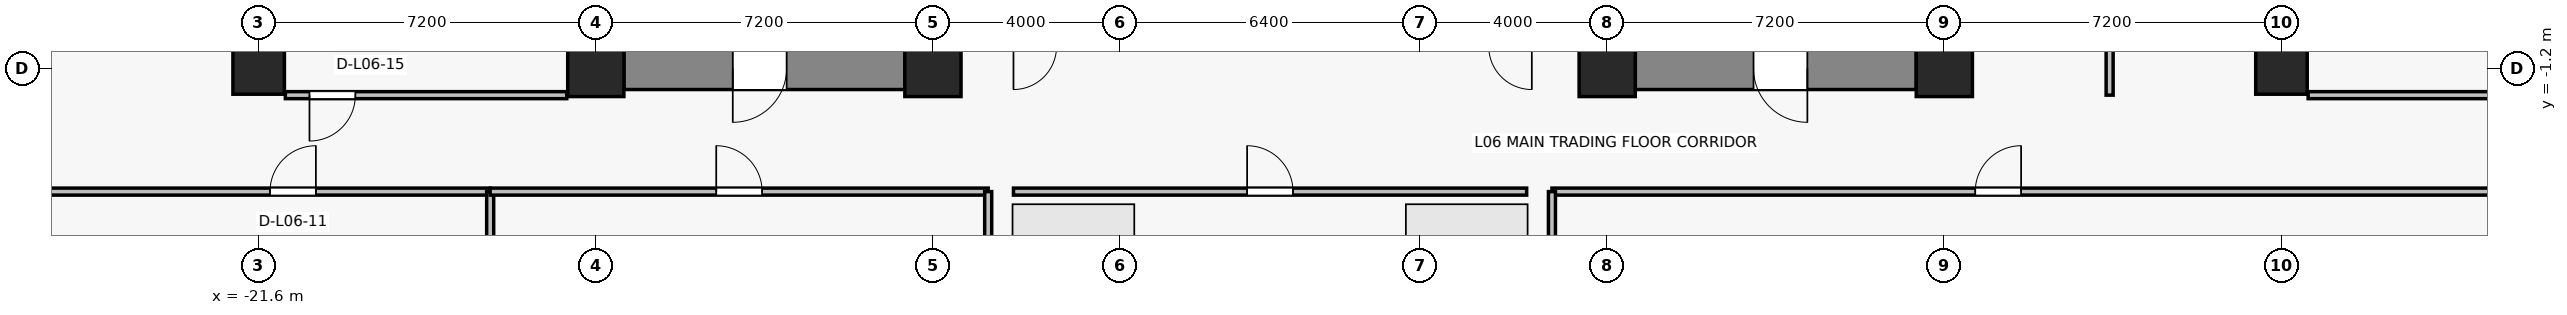
"""IFC4 building model, lengths in metres.
Left out: names, types, materials, properties, quantities, classifications, styles, units other than length and angle.
Written with IfcOpenShell. Run it as: python <this file> out.ifc"""

import sys

from ifc_helpers import new_model, si_unit, direction, frame, frame_2d, origin, origin_2d, place, context, subcontext, project, spatial, rectangle, extrude, source, transform, mapped, element, fill, save


model = new_model("IFC4")
c1 = context("Model", 3, precision=1e-05, world=origin(), true_north=direction((0.0, 1.0)))
c2 = subcontext(c1, "Body", "Model", "MODEL_VIEW")
j1 = project(units=[si_unit("LENGTHUNIT", "METRE"), si_unit("PLANEANGLEUNIT", "RADIAN")], contexts=[c1])
p1 = place(None, origin())
s1 = spatial("IfcSite", under=j1, at=p1, CompositionType="ELEMENT")
p2 = place(p1, origin())
s2 = spatial("IfcBuilding", under=s1, at=p2, CompositionType="ELEMENT")
p3 = place(p2, frame((0.0, 0.0, 27.4)))
s3 = spatial("IfcBuildingStorey", under=s2, at=p3, CompositionType="ELEMENT", Elevation=27.4)
for number, where, z_axis, x_axis in (
    (1, (-14.4, -1.2, 0.0), (0.0, 0.0, 1.0), (1.0, 0.0, 0.0)),
    (2, (-7.2, -1.2, 0.0), (0.0, 0.0, 1.0), (1.0, 0.0, 0.0)),
    (3, (7.2, -1.2, 0.0), (0.0, 0.0, 1.0), (1.0, 0.0, 0.0)),
    (4, (14.4, -1.2, 0.0), (0.0, 0.0, 1.0), (1.0, 0.0, 0.0)),
):
    element("IfcColumn", number, at=place(p3, frame(where, z_axis=z_axis, x_axis=x_axis)), inside=s3, PredefinedType="COLUMN", context=c2, shape_type="SweptSolid", body=[
        extrude(rectangle(XDim=1.2, YDim=1.2, at=origin_2d()), origin(), (0.0, 0.0, 1.0), 3.3),
    ])
for number, where, z_axis, x_axis in (
    (5, (-21.6, -1.2, 0.0), (0.0, 0.0, 1.0), (1.0, 0.0, 0.0)),
    (6, (21.6, -1.2, 0.0), (0.0, 0.0, 1.0), (1.0, 0.0, 0.0)),
):
    element("IfcColumn", number, at=place(p3, frame(where, z_axis=z_axis, x_axis=x_axis)), inside=s3, PredefinedType="COLUMN", context=c2, shape_type="SweptSolid", body=[
        extrude(rectangle(XDim=1.1, YDim=1.1, at=origin_2d()), origin(), (0.0, 0.0, 1.0), 3.3),
    ])
p4 = place(p3, frame((-7.8, -1.2, 0.0), z_axis=(0.0, 0.0, 1.0), x_axis=(-1.0, 0.0, 0.0)))
e7 = element("IfcWall", 7, at=p4, inside=s3, PredefinedType="SHEAR", context=c2, shape_type="SweptSolid", body=[
    extrude(rectangle(XDim=6.0, YDim=0.9, at=frame_2d((3.0, 0.0))), origin(), (0.0, 0.0, 1.0), 3.075),
])
p5 = place(p4, frame((2.525, 0.0, 0.0)))
e8 = element("IfcOpeningElement", 8, at=p5, cuts=e7, PredefinedType="OPENING", context=c2, shape_type="SweptSolid", body=[
    extrude(rectangle(XDim=1.15, YDim=2.15, at=frame_2d((0.575, 1.075))), frame((0.0, 0.46, 0.0), z_axis=(0.0, -1.0, 0.0), x_axis=(1.0, 0.0, 0.0)), (0.0, 0.0, 1.0), 0.92),
])
p6 = place(p3, frame((13.8, -1.2, 0.0), z_axis=(0.0, 0.0, 1.0), x_axis=(-1.0, 0.0, 0.0)))
e9 = element("IfcWall", 9, at=p6, inside=s3, PredefinedType="SHEAR", context=c2, shape_type="SweptSolid", body=[
    extrude(rectangle(XDim=6.0, YDim=0.9, at=frame_2d((3.0, 0.0))), origin(), (0.0, 0.0, 1.0), 3.075),
])
p7 = place(p6, frame((2.325, 0.0, 0.0)))
e10 = element("IfcOpeningElement", 10, at=p7, cuts=e9, PredefinedType="OPENING", context=c2, shape_type="SweptSolid", body=[
    extrude(rectangle(XDim=1.15, YDim=2.15, at=frame_2d((0.575, 1.075))), frame((0.0, 0.46, 0.0), z_axis=(0.0, -1.0, 0.0), x_axis=(1.0, 0.0, 0.0)), (0.0, 0.0, 1.0), 0.92),
])
p8 = place(p3, frame((-32.53, -3.83, 0.0), z_axis=(0.0, 0.0, 1.0), x_axis=(1.0, 0.0, 0.0)))
e11 = element("IfcWall", 11, at=p8, inside=s3, PredefinedType="PARTITIONING", context=c2, shape_type="SweptSolid", body=[
    extrude(rectangle(XDim=15.874, YDim=0.15, at=frame_2d((7.937, 0.0))), origin(), (0.0, 0.0, 1.0), 2.465),
])
p9 = place(p8, frame((11.172, 0.0, 0.0)))
e12 = element("IfcOpeningElement", 12, at=p9, cuts=e11, PredefinedType="OPENING", context=c2, shape_type="SweptSolid", body=[
    extrude(rectangle(XDim=0.98, YDim=2.15, at=frame_2d((0.49, 1.075))), frame((0.0, 0.085, 0.0), z_axis=(0.0, -1.0, 0.0), x_axis=(1.0, 0.0, 0.0)), (0.0, 0.0, 1.0), 0.17),
])
p10 = place(p3, frame((-16.656, -3.83, 0.0), z_axis=(0.0, 0.0, 1.0), x_axis=(0.0, -1.0, 0.0)))
e13 = element("IfcWall", 13, at=p10, inside=s3, PredefinedType="PARTITIONING", context=c2, shape_type="SweptSolid", body=[
    extrude(rectangle(XDim=14.3, YDim=0.15, at=frame_2d((7.15, 0.0))), origin(), (0.0, 0.0, 1.0), 2.465),
])
p11 = place(p3, frame((-16.656, -3.83, 0.0), z_axis=(0.0, 0.0, 1.0), x_axis=(1.0, 0.0, 0.0)))
e14 = element("IfcWall", 14, at=p11, inside=s3, PredefinedType="PARTITIONING", context=c2, shape_type="SweptSolid", body=[
    extrude(rectangle(XDim=10.636, YDim=0.15, at=frame_2d((5.318, 0.0))), origin(), (0.0, 0.0, 1.0), 2.465),
])
p12 = place(p11, frame((4.828, 0.0, 0.0)))
e15 = element("IfcOpeningElement", 15, at=p12, cuts=e14, PredefinedType="OPENING", context=c2, shape_type="SweptSolid", body=[
    extrude(rectangle(XDim=0.98, YDim=2.15, at=frame_2d((0.49, 1.075))), frame((0.0, 0.085, 0.0), z_axis=(0.0, -1.0, 0.0), x_axis=(1.0, 0.0, 0.0)), (0.0, 0.0, 1.0), 0.17),
])
p13 = place(p3, frame((-6.02, -3.83, 0.0), z_axis=(0.0, 0.0, 1.0), x_axis=(0.0, -1.0, 0.0)))
e16 = element("IfcWall", 16, at=p13, inside=s3, PredefinedType="PARTITIONING", context=c2, shape_type="SweptSolid", body=[
    extrude(rectangle(XDim=14.3, YDim=0.15, at=frame_2d((7.15, 0.0))), origin(), (0.0, 0.0, 1.0), 2.465),
])
p14 = place(p3, frame((6.02, -3.83, 0.0), z_axis=(0.0, 0.0, 1.0), x_axis=(1.0, 0.0, 0.0)))
e17 = element("IfcWall", 17, at=p14, inside=s3, PredefinedType="PARTITIONING", context=c2, shape_type="SweptSolid", body=[
    extrude(rectangle(XDim=22.51, YDim=0.15, at=frame_2d((11.255, 0.0))), origin(), (0.0, 0.0, 1.0), 2.465),
])
p15 = place(p14, frame((9.04, 0.0, 0.0)))
e18 = element("IfcOpeningElement", 18, at=p15, cuts=e17, PredefinedType="OPENING", context=c2, shape_type="SweptSolid", body=[
    extrude(rectangle(XDim=0.98, YDim=2.15, at=frame_2d((0.49, 1.075))), frame((0.0, 0.085, 0.0), z_axis=(0.0, -1.0, 0.0), x_axis=(1.0, 0.0, 0.0)), (0.0, 0.0, 1.0), 0.17),
])
p16 = place(p3, frame((6.02, -18.13, 0.0), z_axis=(0.0, 0.0, 1.0), x_axis=(0.0, 1.0, 0.0)))
e19 = element("IfcWall", 19, at=p16, inside=s3, PredefinedType="PARTITIONING", context=c2, shape_type="SweptSolid", body=[
    extrude(rectangle(XDim=14.3, YDim=0.15, at=frame_2d((7.15, 0.0))), origin(), (0.0, 0.0, 1.0), 2.465),
])
p17 = place(p3, frame((-5.48, -3.83, 0.0), z_axis=(0.0, 0.0, 1.0), x_axis=(1.0, 0.0, 0.0)))
e20 = element("IfcWall", 20, at=p17, inside=s3, PredefinedType="PARTITIONING", context=c2, shape_type="SweptSolid", body=[
    extrude(rectangle(XDim=10.96, YDim=0.15, at=frame_2d((5.48, 0.0))), origin(), (0.0, 0.0, 1.0), 3.075),
])
p18 = place(p17, frame((4.99, 0.0, 0.0)))
e21 = element("IfcOpeningElement", 21, at=p18, cuts=e20, PredefinedType="OPENING", context=c2, shape_type="SweptSolid", body=[
    extrude(rectangle(XDim=0.98, YDim=2.15, at=frame_2d((0.49, 1.075))), frame((0.0, 0.085, 0.0), z_axis=(0.0, -1.0, 0.0), x_axis=(1.0, 0.0, 0.0)), (0.0, 0.0, 1.0), 0.17),
])
p19 = place(p3, frame((-15.02, -1.77, 0.0), z_axis=(0.0, 0.0, 1.0), x_axis=(-1.0, 0.0, 0.0)))
e22 = element("IfcWall", 22, at=p19, inside=s3, PredefinedType="PARTITIONING", context=c2, shape_type="SweptSolid", body=[
    extrude(rectangle(XDim=6.01, YDim=0.15, at=frame_2d((3.005, 0.0))), origin(), (0.0, 0.0, 1.0), 3.075),
])
p20 = place(p19, frame((4.515, 0.0, 0.0)))
e23 = element("IfcOpeningElement", 23, at=p20, cuts=e22, PredefinedType="OPENING", context=c2, shape_type="SweptSolid", body=[
    extrude(rectangle(XDim=0.98, YDim=2.15, at=frame_2d((0.49, 1.075))), frame((0.0, 0.085, 0.0), z_axis=(0.0, -1.0, 0.0), x_axis=(1.0, 0.0, 0.0)), (0.0, 0.0, 1.0), 0.17),
])
p21 = place(p3, frame((28.53, -1.77, 0.0), z_axis=(0.0, 0.0, 1.0), x_axis=(-1.0, 0.0, 0.0)))
e24 = element("IfcWall", 24, at=p21, inside=s3, PredefinedType="PARTITIONING", context=c2, shape_type="SweptSolid", body=[
    extrude(rectangle(XDim=6.36, YDim=0.15, at=frame_2d((3.18, 0.0))), origin(), (0.0, 0.0, 1.0), 2.465),
])
p22 = place(p3, frame((17.93, -1.77, 0.0), z_axis=(0.0, 0.0, 1.0), x_axis=(0.0, 1.0, 0.0)))
e25 = element("IfcWall", 25, at=p22, inside=s3, PredefinedType="PARTITIONING", context=c2, shape_type="SweptSolid", body=[
    extrude(rectangle(XDim=6.292, YDim=0.15, at=frame_2d((3.146, 0.0))), origin(), (0.0, 0.0, 1.0), 2.465),
])
p23 = place(p22, frame((2.656, 0.0, 0.0)))
e26 = element("IfcOpeningElement", 26, at=p23, cuts=e25, PredefinedType="OPENING", context=c2, shape_type="SweptSolid", body=[
    extrude(rectangle(XDim=0.98, YDim=2.15, at=frame_2d((0.49, 1.075))), frame((0.0, 0.085, 0.0), z_axis=(0.0, -1.0, 0.0), x_axis=(1.0, 0.0, 0.0)), (0.0, 0.0, 1.0), 0.17),
])
p24 = place(p3, frame((0.0, 0.0, -0.25)))
p25 = place(p24, frame((-4.2, -5.7, 0.0)))
p26 = place(p25, frame((0.0, 0.0, 0.2)))
e27 = element("IfcWindow", 27, at=p26, inside=s3, PartitioningType="SINGLE_PANEL", PredefinedType="SKYLIGHT", context=c2, shape_type="SweptSolid", body=[
    extrude(rectangle(XDim=2.6, YDim=3.2, at=origin_2d()), origin(), (0.0, 0.0, 1.0), 0.05),
])
p27 = place(p24, frame((4.2, -5.7, 0.0)))
p28 = place(p27, frame((0.0, 0.0, 0.2)))
e28 = element("IfcWindow", 28, at=p28, inside=s3, PartitioningType="SINGLE_PANEL", PredefinedType="SKYLIGHT", context=c2, shape_type="SweptSolid", body=[
    extrude(rectangle(XDim=2.6, YDim=3.2, at=origin_2d()), origin(), (0.0, 0.0, 1.0), 0.05),
])
m1 = source(origin(), c2, "Body", "SweptSolid", [
    extrude(rectangle(XDim=1.15, YDim=2.15, at=frame_2d((0.575, 1.075))), frame((0.0, 0.025, 0.0), z_axis=(0.0, -1.0, 0.0), x_axis=(1.0, 0.0, 0.0)), (0.0, 0.0, 1.0), 0.05),
])
p29 = place(p5, origin())
e29 = element("IfcDoor", 29, at=p29, inside=s3, OperationType="SINGLE_SWING_RIGHT", PredefinedType="DOOR", context=c2, shape_type="MappedRepresentation", body=[
    mapped(m1, transform((0.0, 0.0, 0.0), x_axis=(1.0, 0.0, 0.0), y_axis=(0.0, 1.0, 0.0), z_axis=(0.0, 0.0, 1.0), scale=1.0)),
])
fill(e8, e29)
p30 = place(p7, origin())
e30 = element("IfcDoor", 30, at=p30, inside=s3, OperationType="SINGLE_SWING_LEFT", PredefinedType="DOOR", context=c2, shape_type="MappedRepresentation", body=[
    mapped(m1, transform((0.0, 0.0, 0.0), x_axis=(1.0, 0.0, 0.0), y_axis=(0.0, 1.0, 0.0), z_axis=(0.0, 0.0, 1.0), scale=1.0)),
])
fill(e10, e30)
m2 = source(origin(), c2, "Body", "SweptSolid", [
    extrude(rectangle(XDim=0.98, YDim=2.15, at=frame_2d((0.49, 1.075))), frame((0.0, 0.025, 0.0), z_axis=(0.0, -1.0, 0.0), x_axis=(1.0, 0.0, 0.0)), (0.0, 0.0, 1.0), 0.05),
])
p31 = place(p9, origin())
e31 = element("IfcDoor", 31, at=p31, inside=s3, OperationType="SINGLE_SWING_RIGHT", PredefinedType="DOOR", context=c2, shape_type="MappedRepresentation", body=[
    mapped(m2, transform((0.0, 0.0, 0.0), x_axis=(1.0, 0.0, 0.0), y_axis=(0.0, 1.0, 0.0), z_axis=(0.0, 0.0, 1.0), scale=1.0)),
])
fill(e12, e31)
p32 = place(p12, origin())
e32 = element("IfcDoor", 32, at=p32, inside=s3, OperationType="SINGLE_SWING_LEFT", PredefinedType="DOOR", context=c2, shape_type="MappedRepresentation", body=[
    mapped(m2, transform((0.0, 0.0, 0.0), x_axis=(1.0, 0.0, 0.0), y_axis=(0.0, 1.0, 0.0), z_axis=(0.0, 0.0, 1.0), scale=1.0)),
])
fill(e15, e32)
p33 = place(p15, origin())
e33 = element("IfcDoor", 33, at=p33, inside=s3, OperationType="SINGLE_SWING_RIGHT", PredefinedType="DOOR", context=c2, shape_type="MappedRepresentation", body=[
    mapped(m2, transform((0.0, 0.0, 0.0), x_axis=(1.0, 0.0, 0.0), y_axis=(0.0, 1.0, 0.0), z_axis=(0.0, 0.0, 1.0), scale=1.0)),
])
fill(e18, e33)
p34 = place(p18, origin())
e34 = element("IfcDoor", 34, at=p34, inside=s3, OperationType="SINGLE_SWING_LEFT", PredefinedType="DOOR", context=c2, shape_type="MappedRepresentation", body=[
    mapped(m2, transform((0.0, 0.0, 0.0), x_axis=(1.0, 0.0, 0.0), y_axis=(0.0, 1.0, 0.0), z_axis=(0.0, 0.0, 1.0), scale=1.0)),
])
fill(e21, e34)
p35 = place(p20, origin())
e35 = element("IfcDoor", 35, at=p35, inside=s3, OperationType="SINGLE_SWING_RIGHT", PredefinedType="DOOR", context=c2, shape_type="MappedRepresentation", body=[
    mapped(m2, transform((0.0, 0.0, 0.0), x_axis=(1.0, 0.0, 0.0), y_axis=(0.0, 1.0, 0.0), z_axis=(0.0, 0.0, 1.0), scale=1.0)),
])
fill(e23, e35)
save(model, sys.argv[1])
